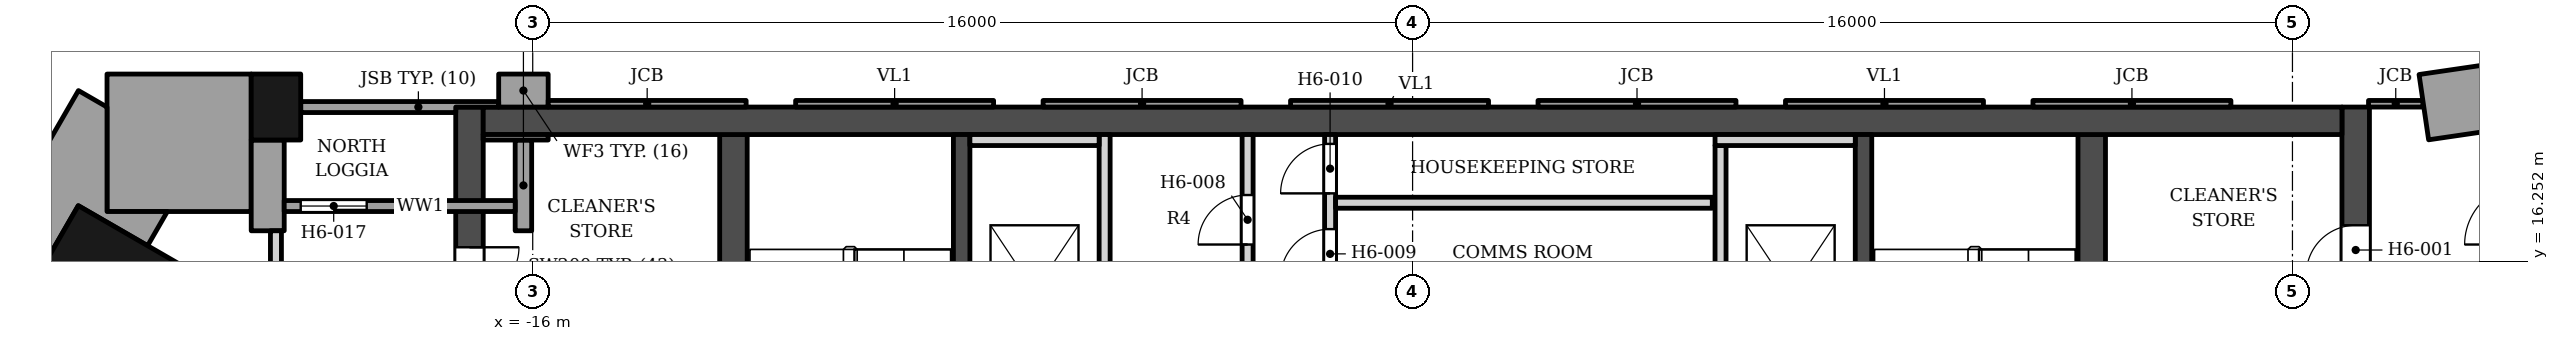
"""IFC4 building model, lengths in metres.
Left out: names, types, materials, properties, quantities, classifications, styles, units other than length and angle.
Written with IfcOpenShell. Run it as: python <this file> out.ifc"""

import sys

from ifc_helpers import new_model, si_unit, direction, frame, frame_2d, origin, origin_2d, place, context, subcontext, project, spatial, polyline, rectangle, outline, extrude, element, fill, save


model = new_model("IFC4")
c1 = context("Model", 3, precision=1e-05, world=origin(), true_north=direction((0.0, 1.0)))
c2 = subcontext(c1, "Body", "Model", "MODEL_VIEW")
j1 = project(units=[si_unit("LENGTHUNIT", "METRE"), si_unit("PLANEANGLEUNIT", "RADIAN")], contexts=[c1])
p1 = place(None, origin())
s1 = spatial("IfcSite", under=j1, at=p1, CompositionType="ELEMENT")
p2 = place(p1, origin())
s2 = spatial("IfcBuilding", under=s1, at=p2, CompositionType="ELEMENT")
p3 = place(p2, frame((0.0, 0.0, 102.0)))
s3 = spatial("IfcBuildingStorey", under=s2, at=p3, CompositionType="ELEMENT", Elevation=102.0)
p4 = place(p3, frame((-16.9, 18.802, 0.0), z_axis=(0.0, 0.0, 1.0), x_axis=(1.0, 0.0, 0.0)))
e1 = element("IfcWall", 1, at=p4, inside=s3, PredefinedType="SHEAR", context=c2, shape_type="SweptSolid", body=[
    extrude(rectangle(XDim=33.8, YDim=0.5, at=frame_2d((16.9, 0.0))), origin(), (0.0, 0.0, 1.0), 3.4),
])
p5 = place(p3, frame((-12.35, 5.253, 0.0), z_axis=(0.0, 0.0, 1.0), x_axis=(0.0, 1.0, 0.0)))
e2 = element("IfcWall", 2, at=p5, inside=s3, PredefinedType="SHEAR", context=c2, shape_type="SweptSolid", body=[
    extrude(rectangle(XDim=13.3, YDim=0.5, at=frame_2d((6.65, 0.0))), origin(), (0.0, 0.0, 1.0), 3.4),
])
p6 = place(p3, frame((-8.2, 5.253, 0.0), z_axis=(0.0, 0.0, 1.0), x_axis=(0.0, 1.0, 0.0)))
e3 = element("IfcWall", 3, at=p6, inside=s3, PredefinedType="SHEAR", context=c2, shape_type="SweptSolid", body=[
    extrude(rectangle(XDim=13.3, YDim=0.3, at=frame_2d((6.65, 0.0))), origin(), (0.0, 0.0, 1.0), 3.4),
])
p7 = place(p6, frame((7.1, 0.0, 0.0)))
e4 = element("IfcOpeningElement", 4, at=p7, cuts=e3, PredefinedType="OPENING", context=c2, shape_type="SweptSolid", body=[
    extrude(rectangle(XDim=1.4, YDim=2.1, at=frame_2d((0.7, 1.05))), frame((0.0, 0.16, 0.0), z_axis=(0.0, -1.0, 0.0), x_axis=(1.0, 0.0, 0.0)), (0.0, 0.0, 1.0), 0.32),
])
p8 = place(p6, frame((5.05, 0.0, 0.0)))
e5 = element("IfcOpeningElement", 5, at=p8, cuts=e3, PredefinedType="OPENING", context=c2, shape_type="SweptSolid", body=[
    extrude(rectangle(XDim=1.4, YDim=2.1, at=frame_2d((0.7, 1.05))), frame((0.0, 0.16, 0.0), z_axis=(0.0, -1.0, 0.0), x_axis=(1.0, 0.0, 0.0)), (0.0, 0.0, 1.0), 0.32),
])
p9 = place(p3, frame((12.35, 5.253, 0.0), z_axis=(0.0, 0.0, 1.0), x_axis=(0.0, 1.0, 0.0)))
e6 = element("IfcWall", 6, at=p9, inside=s3, PredefinedType="SHEAR", context=c2, shape_type="SweptSolid", body=[
    extrude(rectangle(XDim=13.3, YDim=0.5, at=frame_2d((6.65, 0.0))), origin(), (0.0, 0.0, 1.0), 3.4),
])
p10 = place(p3, frame((8.2, 5.253, 0.0), z_axis=(0.0, 0.0, 1.0), x_axis=(0.0, 1.0, 0.0)))
e7 = element("IfcWall", 7, at=p10, inside=s3, PredefinedType="SHEAR", context=c2, shape_type="SweptSolid", body=[
    extrude(rectangle(XDim=13.3, YDim=0.3, at=frame_2d((6.65, 0.0))), origin(), (0.0, 0.0, 1.0), 3.4),
])
p11 = place(p10, frame((7.1, 0.0, 0.0)))
e8 = element("IfcOpeningElement", 8, at=p11, cuts=e7, PredefinedType="OPENING", context=c2, shape_type="SweptSolid", body=[
    extrude(rectangle(XDim=1.4, YDim=2.1, at=frame_2d((0.7, 1.05))), frame((0.0, 0.16, 0.0), z_axis=(0.0, -1.0, 0.0), x_axis=(1.0, 0.0, 0.0)), (0.0, 0.0, 1.0), 0.32),
])
p12 = place(p10, frame((5.05, 0.0, 0.0)))
e9 = element("IfcOpeningElement", 9, at=p12, cuts=e7, PredefinedType="OPENING", context=c2, shape_type="SweptSolid", body=[
    extrude(rectangle(XDim=1.4, YDim=2.1, at=frame_2d((0.7, 1.05))), frame((0.0, 0.16, 0.0), z_axis=(0.0, -1.0, 0.0), x_axis=(1.0, 0.0, 0.0)), (0.0, 0.0, 1.0), 0.32),
])
p13 = place(p3, frame((-17.15, 5.853, 0.0), z_axis=(0.0, 0.0, 1.0), x_axis=(0.0, 1.0, 0.0)))
e10 = element("IfcWall", 10, at=p13, inside=s3, PredefinedType="SHEAR", context=c2, shape_type="SweptSolid", body=[
    extrude(rectangle(XDim=13.2, YDim=0.5, at=frame_2d((6.6, 0.0))), origin(), (0.0, 0.0, 1.0), 3.4),
])
p14 = place(p13, frame((4.1, 0.0, 0.0)))
e11 = element("IfcOpeningElement", 11, at=p14, cuts=e10, PredefinedType="OPENING", context=c2, shape_type="SweptSolid", body=[
    extrude(rectangle(XDim=1.6, YDim=2.1, at=frame_2d((0.8, 1.05))), frame((0.0, 0.26, 0.0), z_axis=(0.0, -1.0, 0.0), x_axis=(1.0, 0.0, 0.0)), (0.0, 0.0, 1.0), 0.52),
])
p15 = place(p13, frame((9.75, 0.0, 0.0)))
e12 = element("IfcOpeningElement", 12, at=p15, cuts=e10, PredefinedType="OPENING", context=c2, shape_type="SweptSolid", body=[
    extrude(rectangle(XDim=0.9, YDim=2.1, at=frame_2d((0.45, 1.05))), frame((0.0, 0.26, 0.0), z_axis=(0.0, -1.0, 0.0), x_axis=(1.0, 0.0, 0.0)), (0.0, 0.0, 1.0), 0.52),
])
p16 = place(p3, frame((17.15, 5.853, 0.0), z_axis=(0.0, 0.0, 1.0), x_axis=(0.0, 1.0, 0.0)))
e13 = element("IfcWall", 13, at=p16, inside=s3, PredefinedType="SHEAR", context=c2, shape_type="SweptSolid", body=[
    extrude(rectangle(XDim=13.2, YDim=0.5, at=frame_2d((6.6, 0.0))), origin(), (0.0, 0.0, 1.0), 3.4),
])
p17 = place(p16, frame((4.1, 0.0, 0.0)))
e14 = element("IfcOpeningElement", 14, at=p17, cuts=e13, PredefinedType="OPENING", context=c2, shape_type="SweptSolid", body=[
    extrude(rectangle(XDim=1.6, YDim=2.1, at=frame_2d((0.8, 1.05))), frame((0.0, 0.26, 0.0), z_axis=(0.0, -1.0, 0.0), x_axis=(1.0, 0.0, 0.0)), (0.0, 0.0, 1.0), 0.52),
])
p18 = place(p16, frame((10.15, 0.0, 0.0)))
e15 = element("IfcOpeningElement", 15, at=p18, cuts=e13, PredefinedType="OPENING", context=c2, shape_type="SweptSolid", body=[
    extrude(rectangle(XDim=0.9, YDim=2.1, at=frame_2d((0.45, 1.05))), frame((0.0, 0.26, 0.0), z_axis=(0.0, -1.0, 0.0), x_axis=(1.0, 0.0, 0.0)), (0.0, 0.0, 1.0), 0.52),
])
p19 = place(p3, frame((-23.724, 15.244, 0.0), z_axis=(0.0, 0.0, 1.0), x_axis=(0.866025403784, -0.5, 0.0)))
e16 = element("IfcColumn", 16, at=p19, inside=s3, PredefinedType="COLUMN", context=c2, shape_type="SweptSolid", body=[
    extrude(rectangle(XDim=2.95, YDim=2.95, at=origin_2d()), origin(), (0.0, 0.0, 1.0), 3.4),
])
p20 = place(p3, frame((-20.669, 19.053, 0.0), z_axis=(0.0, 0.0, 1.0), x_axis=(-1.0, 0.0, 0.0)))
e17 = element("IfcColumn", 17, at=p20, inside=s3, PredefinedType="COLUMN", context=c2, shape_type="SweptSolid", body=[
    extrude(rectangle(XDim=0.9, YDim=1.2, at=origin_2d()), origin(), (0.0, 0.0, 1.0), 3.4),
])
p21 = place(p3, origin())
e18 = element("IfcWall", 18, at=p21, inside=s3, PredefinedType="SOLIDWALL", context=c2, shape_type="SweptSolid", body=[
    extrude(outline(polyline([(-15.719, 19.052), (-15.719, 19.653), (-16.619, 19.653), (-16.619, 19.052), (-15.719, 19.052)])), origin(), (0.0, 0.0, 1.0), 2.65),
])
p22 = place(p3, origin())
e19 = element("IfcWall", 19, at=p22, inside=s3, PredefinedType="SOLIDWALL", context=c2, shape_type="SweptSolid", body=[
    extrude(outline(polyline([(-16.902, 18.453), (-16.902, 18.552), (-15.719, 18.552), (-15.719, 18.453), (-16.902, 18.453)])), origin(), (0.0, 0.0, 1.0), 2.65),
])
p23 = place(p3, origin())
e20 = element("IfcWall", 20, at=p23, inside=s3, PredefinedType="SOLIDWALL", context=c2, shape_type="SweptSolid", body=[
    extrude(outline(polyline([(-16.019, 16.802), (-16.019, 18.453), (-16.319, 18.453), (-16.319, 16.802), (-16.019, 16.802)])), origin(), (0.0, 0.0, 1.0), 2.65),
])
p24 = place(p3, origin())
e21 = element("IfcWall", 21, at=p24, inside=s3, PredefinedType="SOLIDWALL", context=c2, shape_type="SweptSolid", body=[
    extrude(outline(polyline([(-21.119, 18.453), (-21.119, 16.802), (-20.519, 16.802), (-20.519, 18.453), (-21.119, 18.453)])), origin(), (0.0, 0.0, 1.0), 2.63),
])
p25 = place(p3, origin())
e22 = element("IfcWall", 22, at=p25, inside=s3, PredefinedType="SOLIDWALL", context=c2, shape_type="SweptSolid", body=[
    extrude(outline(polyline([(11.281, 19.173), (11.281, 19.052), (14.881, 19.052), (14.881, 19.173), (11.281, 19.173)])), origin(), (0.0, 0.0, 1.0), 2.65),
])
p26 = place(p3, origin())
e23 = element("IfcWall", 23, at=p26, inside=s3, PredefinedType="ELEMENTEDWALL", context=c2, shape_type="SweptSolid", body=[
    extrude(outline(polyline([(6.781, 19.173), (6.781, 19.052), (10.381, 19.052), (10.381, 19.173), (6.781, 19.173)])), origin(), (0.0, 0.0, 1.0), 2.65),
])
p27 = place(p3, origin())
e24 = element("IfcWall", 24, at=p27, inside=s3, PredefinedType="SOLIDWALL", context=c2, shape_type="SweptSolid", body=[
    extrude(outline(polyline([(2.281, 19.173), (2.281, 19.052), (5.881, 19.052), (5.881, 19.173), (2.281, 19.173)])), origin(), (0.0, 0.0, 1.0), 2.65),
])
p28 = place(p3, origin())
e25 = element("IfcWall", 25, at=p28, inside=s3, PredefinedType="ELEMENTEDWALL", context=c2, shape_type="SweptSolid", body=[
    extrude(outline(polyline([(-2.219, 19.173), (-2.219, 19.052), (1.381, 19.052), (1.381, 19.173), (-2.219, 19.173)])), origin(), (0.0, 0.0, 1.0), 2.65),
])
p29 = place(p3, origin())
e26 = element("IfcWall", 26, at=p29, inside=s3, PredefinedType="SOLIDWALL", context=c2, shape_type="SweptSolid", body=[
    extrude(outline(polyline([(-6.719, 19.173), (-6.719, 19.052), (-3.119, 19.052), (-3.119, 19.173), (-6.719, 19.173)])), origin(), (0.0, 0.0, 1.0), 2.65),
])
p30 = place(p3, origin())
e27 = element("IfcWall", 27, at=p30, inside=s3, PredefinedType="ELEMENTEDWALL", context=c2, shape_type="SweptSolid", body=[
    extrude(outline(polyline([(-11.219, 19.173), (-11.219, 19.052), (-7.619, 19.052), (-7.619, 19.173), (-11.219, 19.173)])), origin(), (0.0, 0.0, 1.0), 2.65),
])
p31 = place(p3, origin())
e28 = element("IfcWall", 28, at=p31, inside=s3, PredefinedType="SOLIDWALL", context=c2, shape_type="SweptSolid", body=[
    extrude(outline(polyline([(-15.719, 19.173), (-15.719, 19.052), (-12.119, 19.052), (-12.119, 19.173), (-15.719, 19.173)])), origin(), (0.0, 0.0, 1.0), 2.65),
])
p32 = place(p3, origin())
e29 = element("IfcWall", 29, at=p32, inside=s3, PredefinedType="SOLIDWALL", context=c2, shape_type="SweptSolid", body=[
    extrude(outline(polyline([(-16.619, 19.052), (-16.619, 19.153), (-20.219, 19.153), (-20.219, 18.953), (-17.4, 18.953), (-17.4, 19.052), (-16.619, 19.052)])), origin(), (0.0, 0.0, 1.0), 2.65),
])
p33 = place(p3, frame((-16.319, 17.252, 0.0), z_axis=(0.0, 0.0, 1.0), x_axis=(-1.0, 0.0, 0.0)))
e30 = element("IfcWall", 30, at=p33, inside=s3, PredefinedType="ELEMENTEDWALL", context=c2, shape_type="SweptSolid", body=[
    extrude(rectangle(XDim=4.2, YDim=0.2, at=frame_2d((2.1, 0.0))), origin(), (0.0, 0.0, 1.0), 2.65),
])
p34 = place(p33, frame((2.7, 0.0, 0.0)))
e31 = element("IfcOpeningElement", 31, at=p34, cuts=e30, PredefinedType="OPENING", context=c2, shape_type="SweptSolid", body=[
    extrude(rectangle(XDim=1.2, YDim=2.4, at=frame_2d((0.6, 1.2))), frame((0.0, 0.11, 0.0), z_axis=(0.0, -1.0, 0.0), x_axis=(1.0, 0.0, 0.0)), (0.0, 0.0, 1.0), 0.22),
])
p35 = place(p3, origin())
e32 = element("IfcWall", 32, at=p35, inside=s3, PredefinedType="SOLIDWALL", context=c2, shape_type="SweptSolid", body=[
    extrude(outline(polyline([(-23.741, 17.153), (-21.119, 17.153), (-21.119, 19.653), (-23.741, 19.653), (-23.741, 17.153)])), origin(), (0.0, 0.0, 1.0), 2.63),
])
p36 = place(p3, origin())
e33 = element("IfcWall", 33, at=p36, inside=s3, PredefinedType="SOLIDWALL", context=c2, shape_type="SweptSolid", body=[
    extrude(outline(polyline([(-23.003, 16.531), (-22.645, 17.153), (-23.741, 17.153), (-23.741, 19.052), (-24.261, 19.353), (-27.551, 13.655), (-25.386, 12.405), (-24.478, 13.976), (-25.739, 14.704), (-24.264, 17.259), (-23.003, 16.531)])), origin(), (0.0, 0.0, 1.0), 2.63),
])
p37 = place(p3, frame((18.389, 19.051, 0.0), z_axis=(0.0, 0.0, 1.0), x_axis=(0.989435994601, 0.144970385211, 0.0)))
e34 = element("IfcWall", 34, at=p37, inside=s3, PredefinedType="SOLIDWALL", context=c2, shape_type="SweptSolid", body=[
    extrude(rectangle(XDim=1.396, YDim=1.2, at=frame_2d((0.698, 0.0))), origin(), (0.0, 0.0, 1.0), 2.65),
])
p38 = place(p3, frame((17.383, 19.113, 0.0), z_axis=(0.0, 0.0, 1.0), x_axis=(1.0, 0.0, 0.0)))
e35 = element("IfcWall", 35, at=p38, inside=s3, PredefinedType="SOLIDWALL", context=c2, shape_type="SweptSolid", body=[
    extrude(rectangle(XDim=0.99, YDim=0.12, at=frame_2d((0.495, 0.0))), origin(), (0.0, 0.0, 1.0), 2.65),
])
p39 = place(p3, frame((-5.6, 14.253, 0.0), z_axis=(0.0, 0.0, 1.0), x_axis=(0.0, 1.0, 0.0)))
e36 = element("IfcWall", 36, at=p39, inside=s3, PredefinedType="SOLIDWALL", context=c2, shape_type="SweptSolid", body=[
    extrude(rectangle(XDim=4.3, YDim=0.2, at=frame_2d((2.15, 0.0))), origin(), (0.0, 0.0, 1.0), 3.23),
])
p40 = place(p3, frame((5.6, 15.453, 0.0), z_axis=(0.0, 0.0, 1.0), x_axis=(0.0, 1.0, 0.0)))
e37 = element("IfcWall", 37, at=p40, inside=s3, PredefinedType="SOLIDWALL", context=c2, shape_type="SweptSolid", body=[
    extrude(rectangle(XDim=2.9, YDim=0.2, at=frame_2d((1.45, 0.0))), origin(), (0.0, 0.0, 1.0), 3.23),
])
p41 = place(p3, frame((-3.0, 15.503, 0.0), z_axis=(0.0, 0.0, 1.0), x_axis=(0.0, 1.0, 0.0)))
e38 = element("IfcWall", 38, at=p41, inside=s3, PredefinedType="SOLIDWALL", context=c2, shape_type="SweptSolid", body=[
    extrude(rectangle(XDim=3.05, YDim=0.2, at=frame_2d((1.525, 0.0))), origin(), (0.0, 0.0, 1.0), 3.23),
])
p42 = place(p41, frame((1.05, 0.0, 0.0)))
e39 = element("IfcOpeningElement", 39, at=p42, cuts=e38, PredefinedType="OPENING", context=c2, shape_type="SweptSolid", body=[
    extrude(rectangle(XDim=0.9, YDim=2.1, at=frame_2d((0.45, 1.05))), frame((0.0, 0.11, 0.0), z_axis=(0.0, -1.0, 0.0), x_axis=(1.0, 0.0, 0.0)), (0.0, 0.0, 1.0), 0.22),
])
p43 = place(p3, frame((-1.5, 15.503, 0.0), z_axis=(0.0, 0.0, 1.0), x_axis=(0.0, 1.0, 0.0)))
e40 = element("IfcWall", 40, at=p43, inside=s3, PredefinedType="SOLIDWALL", context=c2, shape_type="SweptSolid", body=[
    extrude(rectangle(XDim=3.05, YDim=0.2, at=frame_2d((1.525, 0.0))), origin(), (0.0, 0.0, 1.0), 3.23),
])
p44 = place(p43, frame((0.43, 0.0, 0.0)))
e41 = element("IfcOpeningElement", 41, at=p44, cuts=e40, PredefinedType="OPENING", context=c2, shape_type="SweptSolid", body=[
    extrude(rectangle(XDim=0.9, YDim=2.1, at=frame_2d((0.45, 1.05))), frame((0.0, 0.11, 0.0), z_axis=(0.0, -1.0, 0.0), x_axis=(1.0, 0.0, 0.0)), (0.0, 0.0, 1.0), 0.22),
])
p45 = place(p43, frame((1.98, 0.0, 0.0)))
e42 = element("IfcOpeningElement", 42, at=p45, cuts=e40, PredefinedType="OPENING", context=c2, shape_type="SweptSolid", body=[
    extrude(rectangle(XDim=0.9, YDim=2.1, at=frame_2d((0.45, 1.05))), frame((0.0, 0.11, 0.0), z_axis=(0.0, -1.0, 0.0), x_axis=(1.0, 0.0, 0.0)), (0.0, 0.0, 1.0), 0.22),
])
p46 = place(p3, frame((-1.4, 17.312, 0.0), z_axis=(0.0, 0.0, 1.0), x_axis=(1.0, 0.0, 0.0)))
e43 = element("IfcWall", 43, at=p46, inside=s3, PredefinedType="SOLIDWALL", context=c2, shape_type="SweptSolid", body=[
    extrude(rectangle(XDim=6.85, YDim=0.2, at=frame_2d((3.425, 0.0))), origin(), (0.0, 0.0, 1.0), 3.23),
])
p47 = place(p3, frame((-8.05, 18.453, 0.0), z_axis=(0.0, 0.0, 1.0), x_axis=(1.0, 0.0, 0.0)))
e44 = element("IfcWall", 44, at=p47, inside=s3, PredefinedType="SOLIDWALL", context=c2, shape_type="SweptSolid", body=[
    extrude(rectangle(XDim=2.35, YDim=0.2, at=frame_2d((1.175, 0.0))), origin(), (0.0, 0.0, 1.0), 3.23),
])
p48 = place(p3, frame((5.5, 18.453, 0.0), z_axis=(0.0, 0.0, 1.0), x_axis=(1.0, 0.0, 0.0)))
e45 = element("IfcWall", 45, at=p48, inside=s3, PredefinedType="SOLIDWALL", context=c2, shape_type="SweptSolid", body=[
    extrude(rectangle(XDim=2.55, YDim=0.2, at=frame_2d((1.275, 0.0))), origin(), (0.0, 0.0, 1.0), 3.23),
])
p49 = place(p3, frame((-20.669, 16.802, 0.0), z_axis=(0.0, 0.0, 1.0), x_axis=(0.0, -1.0, 0.0)))
e46 = element("IfcWall", 46, at=p49, inside=s3, PredefinedType="PARTITIONING", context=c2, shape_type="SweptSolid", body=[
    extrude(rectangle(XDim=1.55, YDim=0.2, at=frame_2d((0.775, 0.0))), origin(), (0.0, 0.0, 1.0), 3.23),
])
p50 = place(p34, origin())
e47 = element("IfcDoor", 47, at=p50, inside=s3, OperationType="SINGLE_SWING_LEFT", PredefinedType="DOOR", context=c2, shape_type="SweptSolid", body=[
    extrude(rectangle(XDim=1.2, YDim=2.4, at=frame_2d((0.6, 1.2))), frame((0.0, 0.025, 0.0), z_axis=(0.0, -1.0, 0.0), x_axis=(1.0, 0.0, 0.0)), (0.0, 0.0, 1.0), 0.05),
])
fill(e31, e47)
p51 = place(p42, origin())
e48 = element("IfcDoor", 48, at=p51, inside=s3, OperationType="SINGLE_SWING_LEFT", PredefinedType="DOOR", context=c2, shape_type="SweptSolid", body=[
    extrude(rectangle(XDim=0.9, YDim=2.1, at=frame_2d((0.45, 1.05))), frame((0.0, 0.025, 0.0), z_axis=(0.0, -1.0, 0.0), x_axis=(1.0, 0.0, 0.0)), (0.0, 0.0, 1.0), 0.05),
])
fill(e39, e48)
p52 = place(p44, origin())
e49 = element("IfcDoor", 49, at=p52, inside=s3, OperationType="SINGLE_SWING_LEFT", PredefinedType="DOOR", context=c2, shape_type="SweptSolid", body=[
    extrude(rectangle(XDim=0.9, YDim=2.1, at=frame_2d((0.45, 1.05))), frame((0.0, 0.025, 0.0), z_axis=(0.0, -1.0, 0.0), x_axis=(1.0, 0.0, 0.0)), (0.0, 0.0, 1.0), 0.05),
])
fill(e41, e49)
p53 = place(p45, origin())
e50 = element("IfcDoor", 50, at=p53, inside=s3, OperationType="SINGLE_SWING_LEFT", PredefinedType="DOOR", context=c2, shape_type="SweptSolid", body=[
    extrude(rectangle(XDim=0.9, YDim=2.1, at=frame_2d((0.45, 1.05))), frame((0.0, 0.025, 0.0), z_axis=(0.0, -1.0, 0.0), x_axis=(1.0, 0.0, 0.0)), (0.0, 0.0, 1.0), 0.05),
])
fill(e42, e50)
p54 = place(p15, origin())
e51 = element("IfcDoor", 51, at=p54, inside=s3, OperationType="SINGLE_SWING_RIGHT", PredefinedType="DOOR", context=c2, shape_type="SweptSolid", body=[
    extrude(rectangle(XDim=0.9, YDim=2.1, at=frame_2d((0.45, 1.05))), frame((0.0, 0.025, 0.0), z_axis=(0.0, -1.0, 0.0), x_axis=(1.0, 0.0, 0.0)), (0.0, 0.0, 1.0), 0.05),
])
fill(e12, e51)
p55 = place(p18, origin())
e52 = element("IfcDoor", 52, at=p55, inside=s3, OperationType="SINGLE_SWING_LEFT", PredefinedType="DOOR", context=c2, shape_type="SweptSolid", body=[
    extrude(rectangle(XDim=0.9, YDim=2.1, at=frame_2d((0.45, 1.05))), frame((0.0, 0.025, 0.0), z_axis=(0.0, -1.0, 0.0), x_axis=(1.0, 0.0, 0.0)), (0.0, 0.0, 1.0), 0.05),
])
fill(e15, e52)
save(model, sys.argv[1])
